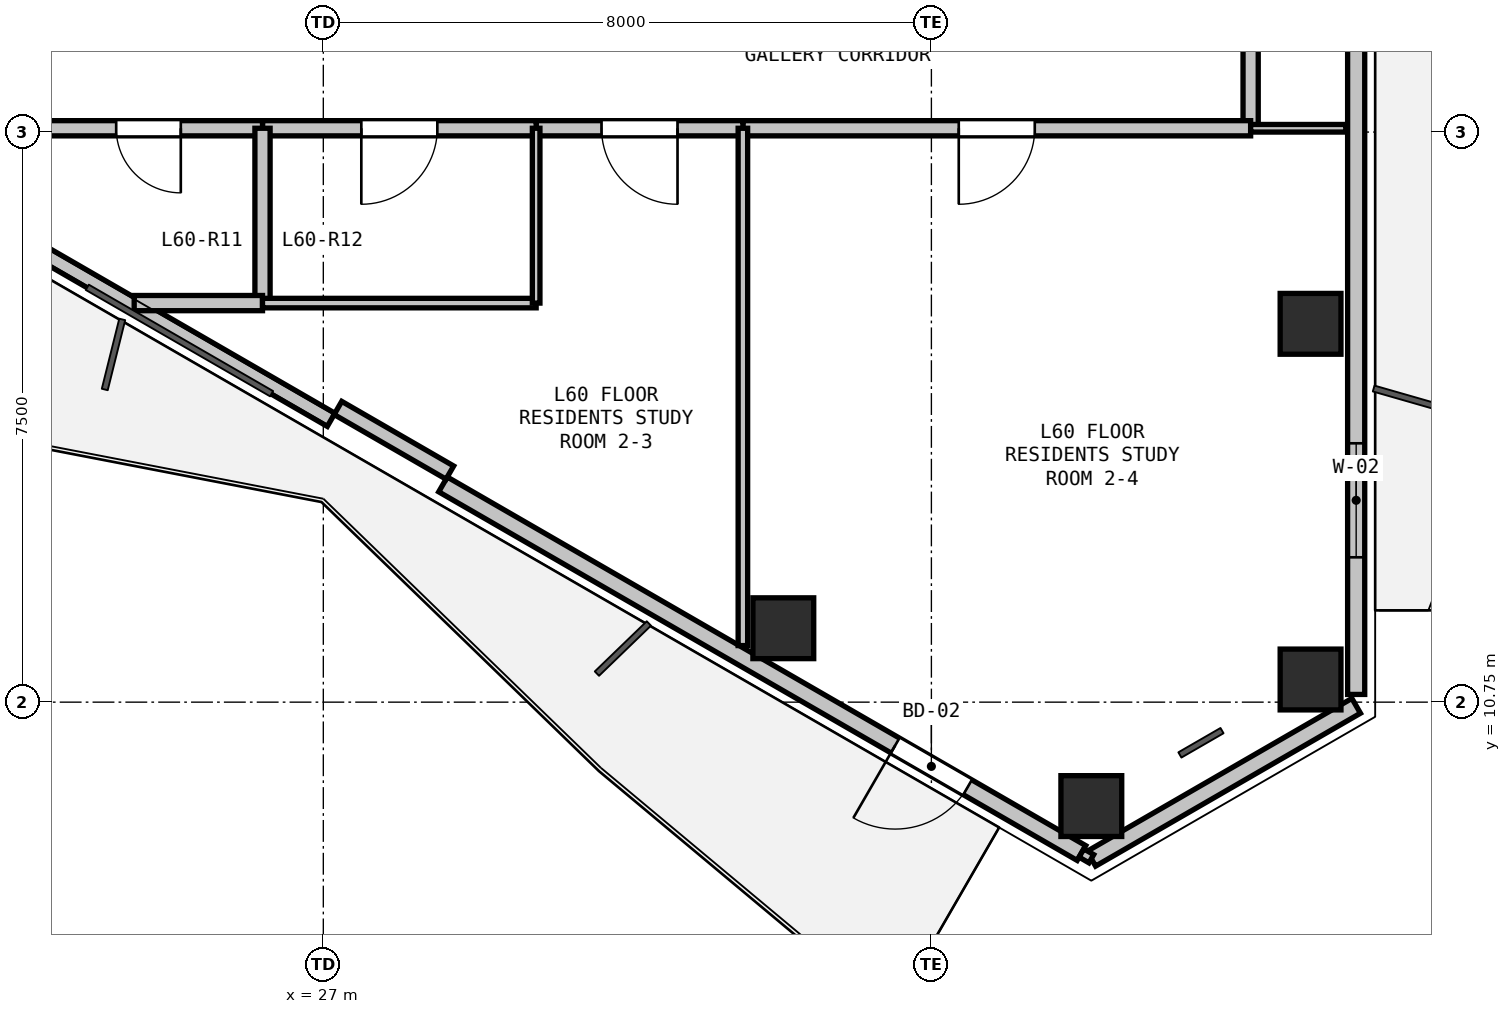
"""IFC4 building model, lengths in metres.
Left out: names, types, materials, properties, quantities, classifications, styles, units other than length and angle.
Written with IfcOpenShell. Run it as: python <this file> out.ifc"""

import sys

from ifc_helpers import new_model, si_unit, direction, frame, frame_2d, origin, origin_2d, place, context, subcontext, project, spatial, rectangle, hollow_rectangle, extrude, element, fill, save


model = new_model("IFC4")
c1 = context("Model", 3, precision=1e-05, world=origin(), true_north=direction((0.0, 1.0)))
c2 = subcontext(c1, "Body", "Model", "MODEL_VIEW")
j1 = project(units=[si_unit("LENGTHUNIT", "METRE"), si_unit("PLANEANGLEUNIT", "RADIAN")], contexts=[c1])
p1 = place(None, origin())
s1 = spatial("IfcSite", under=j1, at=p1, CompositionType="ELEMENT")
p2 = place(p1, origin())
s2 = spatial("IfcBuilding", under=s1, at=p2, CompositionType="ELEMENT")
p3 = place(p2, frame((0.0, 0.0, 215.1)))
s3 = spatial("IfcBuildingStorey", under=s2, at=p3, CompositionType="ELEMENT", Elevation=215.1)
for number, where, z_axis, x_axis in (
    (1, (39.988, 15.727, 0.0), (0.0, 0.0, 1.0), (1.0, 0.0, 0.0)),
    (2, (39.988, 11.048, 0.0), (0.0, 0.0, 1.0), (1.0, 0.0, 0.0)),
    (3, (37.104, 9.383, 0.0), (0.0, 0.0, 1.0), (1.0, 0.0, 0.0)),
    (4, (33.052, 11.722, 0.0), (0.0, 0.0, 1.0), (1.0, 0.0, 0.0)),
):
    element("IfcColumn", number, at=place(p3, frame(where, z_axis=z_axis, x_axis=x_axis)), inside=s3, PredefinedType="COLUMN", context=c2, shape_type="SweptSolid", body=[
        extrude(hollow_rectangle(XDim=0.8, YDim=0.8, WallThickness=0.025, at=origin_2d()), origin(), (0.0, 0.0, 1.0), 3.3),
    ])
p4 = place(p3, frame((40.588, 10.702, 0.0), z_axis=(0.0, 0.0, 1.0), x_axis=(-0.866023907196, -0.500002592159, 0.0)))
e5 = element("IfcWall", 5, at=p4, inside=s3, PredefinedType="SOLIDWALL", context=c2, shape_type="SweptSolid", body=[
    extrude(rectangle(XDim=4.023, YDim=0.225, at=frame_2d((2.012, 0.0))), origin(), (0.0, 0.0, 1.0), 2.64),
])
p5 = place(p3, frame((40.588, 20.551, 0.0), z_axis=(0.0, 0.0, 1.0), x_axis=(0.0, -1.0, 0.0)))
e6 = element("IfcWall", 6, at=p5, inside=s3, PredefinedType="SOLIDWALL", context=c2, shape_type="SweptSolid", body=[
    extrude(rectangle(XDim=9.699, YDim=0.225, at=frame_2d((4.85, 0.0))), origin(), (0.0, 0.0, 1.0), 2.64),
])
p6 = place(p5, frame((6.395, 0.0, 0.9)))
e7 = element("IfcOpeningElement", 7, at=p6, cuts=e6, PredefinedType="OPENING", context=c2, shape_type="SweptSolid", body=[
    extrude(rectangle(XDim=1.5, YDim=1.5, at=frame_2d((0.75, 0.75))), frame((0.0, 0.123, 0.0), z_axis=(0.0, -1.0, 0.0), x_axis=(1.0, 0.0, 0.0)), (0.0, 0.0, 1.0), 0.245),
])
p7 = place(p3, frame((36.974, 8.765, 0.0), z_axis=(0.0, 0.0, 1.0), x_axis=(-0.866016233231, 0.500015883528, 0.0)))
e8 = element("IfcWall", 8, at=p7, inside=s3, PredefinedType="SOLIDWALL", context=c2, shape_type="SweptSolid", body=[
    extrude(rectangle(XDim=9.699, YDim=0.225, at=frame_2d((4.85, 0.0))), origin(), (0.0, 0.0, 1.0), 2.64),
])
p8 = place(p7, frame((1.73, 0.0, 0.0)))
e9 = element("IfcOpeningElement", 9, at=p8, cuts=e8, PredefinedType="OPENING", context=c2, shape_type="SweptSolid", body=[
    extrude(rectangle(XDim=1.1, YDim=2.1, at=frame_2d((0.55, 1.05))), frame((0.0, 0.123, 0.0), z_axis=(0.0, -1.0, 0.0), x_axis=(1.0, 0.0, 0.0)), (0.0, 0.0, 1.0), 0.245),
])
p9 = place(p3, frame((27.102, 14.464, 0.0), z_axis=(0.0, 0.0, 1.0), x_axis=(-0.866020680503, 0.500008180874, 0.0)))
e10 = element("IfcWall", 10, at=p9, inside=s3, PredefinedType="PARAPET", context=c2, shape_type="SweptSolid", body=[
    extrude(rectangle(XDim=8.999, YDim=0.2, at=frame_2d((4.5, 0.0))), origin(), (0.0, 0.0, 1.0), 0.2),
])
p10 = place(p3, frame((28.665, 13.77, 0.0), z_axis=(0.0, 0.0, 1.0), x_axis=(-0.866025371046, 0.500000056704, 0.0)))
e11 = element("IfcWall", 11, at=p10, inside=s3, PredefinedType="PARAPET", context=c2, shape_type="SweptSolid", body=[
    extrude(rectangle(XDim=1.7, YDim=0.2, at=frame_2d((0.85, 0.0))), origin(), (0.0, 0.0, 1.0), 2.64),
])
p11 = place(p3, frame((39.2, 20.75, 0.0), z_axis=(0.0, 0.0, 1.0), x_axis=(0.0, -1.0, 0.0)))
e12 = element("IfcWall", 12, at=p11, inside=s3, PredefinedType="PARTITIONING", context=c2, shape_type="SweptSolid", body=[
    extrude(rectangle(XDim=2.45, YDim=0.2, at=frame_2d((1.225, 0.0))), origin(), (0.0, 0.0, 1.0), 3.02),
])
p12 = place(p3, frame((39.2, 18.3, 0.0), z_axis=(0.0, 0.0, 1.0), x_axis=(-1.0, 0.0, 0.0)))
e13 = element("IfcWall", 13, at=p12, inside=s3, PredefinedType="PARTITIONING", context=c2, shape_type="SweptSolid", body=[
    extrude(rectangle(XDim=6.68, YDim=0.2, at=frame_2d((3.34, 0.0))), origin(), (0.0, 0.0, 1.0), 2.468),
])
p13 = place(p12, frame((2.84, 0.0, 0.0)))
e14 = element("IfcOpeningElement", 14, at=p13, cuts=e13, PredefinedType="OPENING", context=c2, shape_type="SweptSolid", body=[
    extrude(rectangle(XDim=1.0, YDim=2.15, at=frame_2d((0.5, 1.075))), frame((0.0, 0.11, 0.0), z_axis=(0.0, -1.0, 0.0), x_axis=(1.0, 0.0, 0.0)), (0.0, 0.0, 1.0), 0.22),
])
p14 = place(p3, frame((32.52, 18.3, 0.0), z_axis=(0.0, 0.0, 1.0), x_axis=(-1.0, 0.0, 0.0)))
e15 = element("IfcWall", 15, at=p14, inside=s3, PredefinedType="PARTITIONING", context=c2, shape_type="SweptSolid", body=[
    extrude(rectangle(XDim=2.72, YDim=0.2, at=frame_2d((1.36, 0.0))), origin(), (0.0, 0.0, 1.0), 3.02),
])
p15 = place(p14, frame((0.86, 0.0, 0.0)))
e16 = element("IfcOpeningElement", 16, at=p15, cuts=e15, PredefinedType="OPENING", context=c2, shape_type="SweptSolid", body=[
    extrude(rectangle(XDim=1.0, YDim=2.15, at=frame_2d((0.5, 1.075))), frame((0.0, 0.11, 0.0), z_axis=(0.0, -1.0, 0.0), x_axis=(1.0, 0.0, 0.0)), (0.0, 0.0, 1.0), 0.22),
])
p16 = place(p3, frame((29.8, 18.3, 0.0), z_axis=(0.0, 0.0, 1.0), x_axis=(-1.0, 0.0, 0.0)))
e17 = element("IfcWall", 17, at=p16, inside=s3, PredefinedType="PARTITIONING", context=c2, shape_type="SweptSolid", body=[
    extrude(rectangle(XDim=3.6, YDim=0.2, at=frame_2d((1.8, 0.0))), origin(), (0.0, 0.0, 1.0), 3.02),
])
p17 = place(p16, frame((1.3, 0.0, 0.0)))
e18 = element("IfcOpeningElement", 18, at=p17, cuts=e17, PredefinedType="OPENING", context=c2, shape_type="SweptSolid", body=[
    extrude(rectangle(XDim=1.0, YDim=2.15, at=frame_2d((0.5, 1.075))), frame((0.0, 0.11, 0.0), z_axis=(0.0, -1.0, 0.0), x_axis=(1.0, 0.0, 0.0)), (0.0, 0.0, 1.0), 0.22),
])
p18 = place(p3, frame((26.2, 18.3, 0.0), z_axis=(0.0, 0.0, 1.0), x_axis=(-1.0, 0.0, 0.0)))
e19 = element("IfcWall", 19, at=p18, inside=s3, PredefinedType="PARTITIONING", context=c2, shape_type="SweptSolid", body=[
    extrude(rectangle(XDim=3.0, YDim=0.2, at=frame_2d((1.5, 0.0))), origin(), (0.0, 0.0, 1.0), 2.468),
])
p19 = place(p18, frame((1.075, 0.0, 0.0)))
e20 = element("IfcOpeningElement", 20, at=p19, cuts=e19, PredefinedType="OPENING", context=c2, shape_type="SweptSolid", body=[
    extrude(rectangle(XDim=0.85, YDim=2.1, at=frame_2d((0.425, 1.05))), frame((0.0, 0.11, 0.0), z_axis=(0.0, -1.0, 0.0), x_axis=(1.0, 0.0, 0.0)), (0.0, 0.0, 1.0), 0.22),
])
p20 = place(p3, frame((26.2, 18.3, 0.0), z_axis=(0.0, 0.0, 1.0), x_axis=(0.0, -1.0, 0.0)))
e21 = element("IfcWall", 21, at=p20, inside=s3, PredefinedType="PARTITIONING", context=c2, shape_type="SweptSolid", body=[
    extrude(rectangle(XDim=2.3, YDim=0.2, at=frame_2d((1.15, 0.0))), origin(), (0.0, 0.0, 1.0), 2.468),
])
p21 = place(p3, frame((26.2, 16.0, 0.0), z_axis=(0.0, 0.0, 1.0), x_axis=(-1.0, 0.0, 0.0)))
e22 = element("IfcWall", 22, at=p21, inside=s3, PredefinedType="PARTITIONING", context=c2, shape_type="SweptSolid", body=[
    extrude(rectangle(XDim=1.688, YDim=0.2, at=frame_2d((0.844, 0.0))), origin(), (0.0, 0.0, 1.0), 2.365),
])
p22 = place(p3, frame((29.8, 16.0, 0.0), z_axis=(0.0, 0.0, 1.0), x_axis=(-1.0, 0.0, 0.0)))
e23 = element("IfcWall", 23, at=p22, inside=s3, PredefinedType="PARTITIONING", context=c2, shape_type="SweptSolid", body=[
    extrude(rectangle(XDim=3.6, YDim=0.125, at=frame_2d((1.8, 0.0))), origin(), (0.0, 0.0, 1.0), 2.468),
])
p23 = place(p3, frame((29.8, 18.3, 0.0), z_axis=(0.0, 0.0, 1.0), x_axis=(0.0, -1.0, 0.0)))
e24 = element("IfcWall", 24, at=p23, inside=s3, PredefinedType="PARTITIONING", context=c2, shape_type="SweptSolid", body=[
    extrude(rectangle(XDim=2.3, YDim=0.1, at=frame_2d((1.15, 0.0))), origin(), (0.0, 0.0, 1.0), 3.02),
])
p24 = place(p3, frame((32.52, 18.3, 0.0), z_axis=(0.0, 0.0, 1.0), x_axis=(0.0, -1.0, 0.0)))
e25 = element("IfcWall", 25, at=p24, inside=s3, PredefinedType="PARTITIONING", context=c2, shape_type="SweptSolid", body=[
    extrude(rectangle(XDim=6.806, YDim=0.125, at=frame_2d((3.403, 0.0))), origin(), (0.0, 0.0, 1.0), 2.365),
])
p25 = place(p3, frame((39.2, 18.3, 0.0), z_axis=(0.0, 0.0, 1.0), x_axis=(1.0, 0.0, 0.0)))
e26 = element("IfcWall", 26, at=p25, inside=s3, PredefinedType="PARTITIONING", context=c2, shape_type="SweptSolid", body=[
    extrude(rectangle(XDim=1.252, YDim=0.1, at=frame_2d((0.626, 0.0))), origin(), (0.0, 0.0, 1.0), 2.365),
])
p26 = place(p3, frame((37.104, 8.69, 0.0), z_axis=(0.0, 0.0, 1.0), x_axis=(-0.866131372301, 0.499816412211, 0.0)))
e27 = element("IfcWall", 27, at=p26, inside=s3, PredefinedType="PARTITIONING", context=c2, shape_type="SweptSolid", body=[
    extrude(rectangle(XDim=0.15, YDim=0.125, at=frame_2d((0.075, 0.0))), origin(), (0.0, 0.0, 1.0), 3.02),
])
p27 = place(p6, origin())
e28 = element("IfcWindow", 28, at=p27, inside=s3, PartitioningType="SINGLE_PANEL", PredefinedType="WINDOW", context=c2, shape_type="SweptSolid", body=[
    extrude(rectangle(XDim=1.5, YDim=1.5, at=frame_2d((0.75, 0.75))), frame((0.0, 0.03, 0.0), z_axis=(0.0, -1.0, 0.0), x_axis=(1.0, 0.0, 0.0)), (0.0, 0.0, 1.0), 0.06),
])
fill(e7, e28)
p28 = place(p8, origin())
e29 = element("IfcDoor", 29, at=p28, inside=s3, OperationType="SINGLE_SWING_RIGHT", PredefinedType="DOOR", context=c2, shape_type="SweptSolid", body=[
    extrude(rectangle(XDim=1.1, YDim=2.1, at=frame_2d((0.55, 1.05))), frame((0.0, 0.025, 0.0), z_axis=(0.0, -1.0, 0.0), x_axis=(1.0, 0.0, 0.0)), (0.0, 0.0, 1.0), 0.05),
])
fill(e9, e29)
p29 = place(p19, origin())
e30 = element("IfcDoor", 30, at=p29, inside=s3, OperationType="SINGLE_SWING_LEFT", PredefinedType="DOOR", context=c2, shape_type="SweptSolid", body=[
    extrude(rectangle(XDim=0.85, YDim=2.1, at=frame_2d((0.425, 1.05))), frame((0.0, 0.025, 0.0), z_axis=(0.0, -1.0, 0.0), x_axis=(1.0, 0.0, 0.0)), (0.0, 0.0, 1.0), 0.05),
])
fill(e20, e30)
p30 = place(p17, origin())
e31 = element("IfcDoor", 31, at=p30, inside=s3, OperationType="SINGLE_SWING_RIGHT", PredefinedType="DOOR", context=c2, shape_type="SweptSolid", body=[
    extrude(rectangle(XDim=1.0, YDim=2.15, at=frame_2d((0.5, 1.075))), frame((0.0, 0.025, 0.0), z_axis=(0.0, -1.0, 0.0), x_axis=(1.0, 0.0, 0.0)), (0.0, 0.0, 1.0), 0.05),
])
fill(e18, e31)
p31 = place(p15, origin())
e32 = element("IfcDoor", 32, at=p31, inside=s3, OperationType="SINGLE_SWING_LEFT", PredefinedType="DOOR", context=c2, shape_type="SweptSolid", body=[
    extrude(rectangle(XDim=1.0, YDim=2.15, at=frame_2d((0.5, 1.075))), frame((0.0, 0.025, 0.0), z_axis=(0.0, -1.0, 0.0), x_axis=(1.0, 0.0, 0.0)), (0.0, 0.0, 1.0), 0.05),
])
fill(e16, e32)
p32 = place(p13, origin())
e33 = element("IfcDoor", 33, at=p32, inside=s3, OperationType="SINGLE_SWING_RIGHT", PredefinedType="DOOR", context=c2, shape_type="SweptSolid", body=[
    extrude(rectangle(XDim=1.0, YDim=2.15, at=frame_2d((0.5, 1.075))), frame((0.0, 0.025, 0.0), z_axis=(0.0, -1.0, 0.0), x_axis=(1.0, 0.0, 0.0)), (0.0, 0.0, 1.0), 0.05),
])
fill(e14, e33)
save(model, sys.argv[1])
